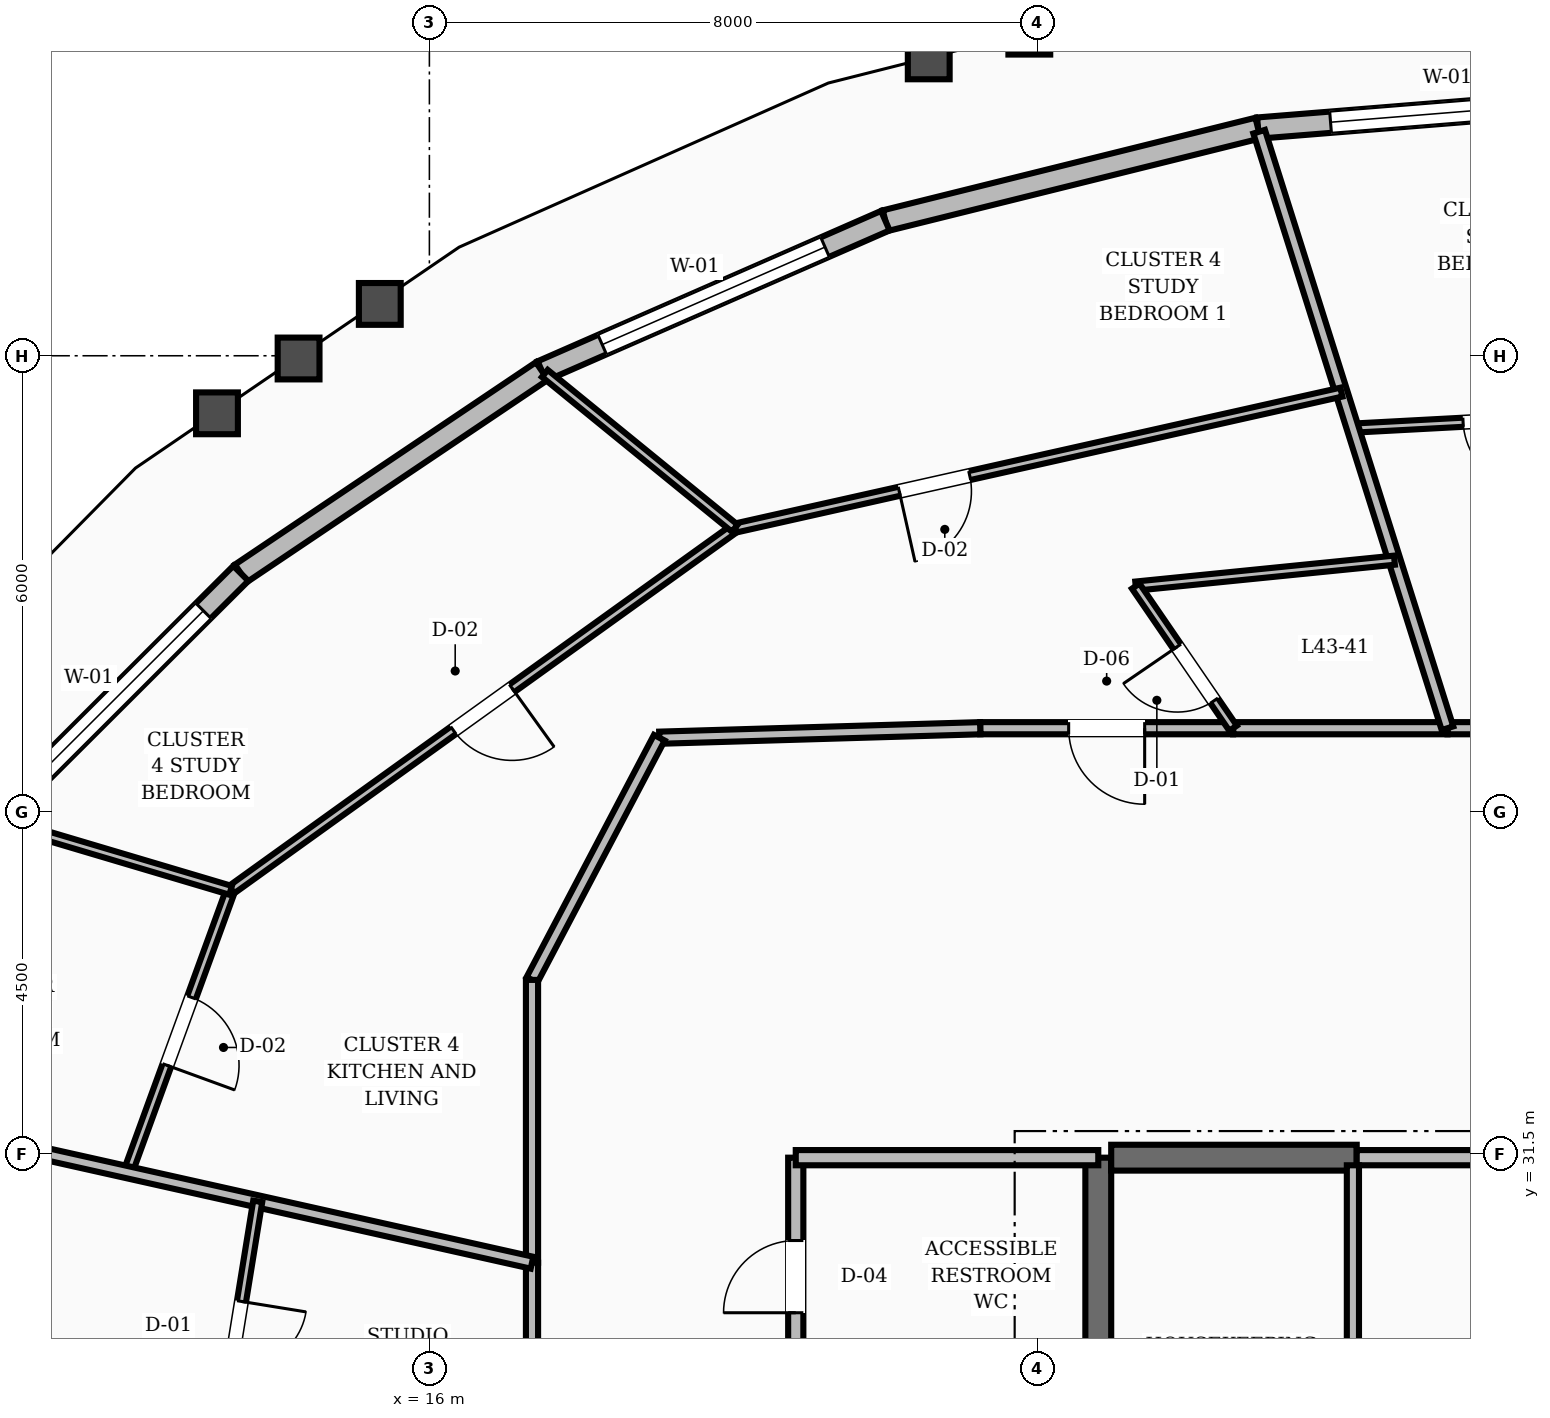
"""IFC4 building model, lengths in metres.
Left out: names, types, materials, properties, quantities, classifications, styles, units other than length and angle.
Written with IfcOpenShell. Run it as: python <this file> out.ifc"""

import sys

from ifc_helpers import new_model, si_unit, direction, frame, frame_2d, origin, place, context, subcontext, project, spatial, rectangle, extrude, element, fill, save


model = new_model("IFC4")
c1 = context("Model", 3, precision=1e-05, world=origin(), true_north=direction((0.0, 1.0)))
c2 = subcontext(c1, "Body", "Model", "MODEL_VIEW")
j1 = project(units=[si_unit("LENGTHUNIT", "METRE"), si_unit("PLANEANGLEUNIT", "RADIAN")], contexts=[c1])
p1 = place(None, origin())
s1 = spatial("IfcSite", under=j1, at=p1, CompositionType="ELEMENT")
p2 = place(p1, origin())
s2 = spatial("IfcBuilding", under=s1, at=p2, CompositionType="ELEMENT")
p3 = place(p2, frame((0.0, 0.0, 167.6)))
s3 = spatial("IfcBuildingStorey", under=s2, at=p3, CompositionType="ELEMENT", Elevation=167.6)
p4 = place(p3, frame((24.8, 25.15, 0.0), z_axis=(0.0, 0.0, 1.0), x_axis=(0.0, 1.0, 0.0)))
e1 = element("IfcWall", 1, at=p4, inside=s3, PredefinedType="SHEAR", context=c2, shape_type="SweptSolid", body=[
    extrude(rectangle(XDim=6.3, YDim=0.34, at=frame_2d((3.15, 0.0))), origin(), (0.0, 0.0, 1.0), 3.6),
])
p5 = place(p3, frame((24.97, 31.45, 0.0), z_axis=(0.0, 0.0, 1.0), x_axis=(1.0, 0.0, 0.0)))
e2 = element("IfcWall", 2, at=p5, inside=s3, PredefinedType="SHEAR", context=c2, shape_type="SweptSolid", body=[
    extrude(rectangle(XDim=3.23, YDim=0.34, at=frame_2d((1.615, 0.0))), origin(), (0.0, 0.0, 1.0), 3.6),
])
p6 = place(p3, frame((32.0, 45.407, 0.0), z_axis=(0.0, 0.0, 1.0), x_axis=(-0.996760870248, -0.080422431831, 0.0)))
e3 = element("IfcWall", 3, at=p6, inside=s3, PredefinedType="STANDARD", context=c2, shape_type="SweptSolid", body=[
    extrude(rectangle(XDim=5.115, YDim=0.28, at=frame_2d((2.558, 0.0))), origin(), (0.0, 0.0, 1.0), 2.82),
])
p7 = place(p6, frame((0.958, 0.0, 0.8)))
e4 = element("IfcOpeningElement", 4, at=p7, cuts=e3, PredefinedType="OPENING", context=c2, shape_type="SweptSolid", body=[
    extrude(rectangle(XDim=3.2, YDim=1.65, at=frame_2d((1.6, 0.825))), frame((0.0, 0.15, 0.0), z_axis=(0.0, -1.0, 0.0), x_axis=(1.0, 0.0, 0.0)), (0.0, 0.0, 1.0), 0.3),
])
p8 = place(p3, frame((26.901, 44.995, 0.0), z_axis=(0.0, 0.0, 1.0), x_axis=(-0.970488320416, -0.241148128617, 0.0)))
e5 = element("IfcWall", 5, at=p8, inside=s3, PredefinedType="STANDARD", context=c2, shape_type="SweptSolid", body=[
    extrude(rectangle(XDim=5.052, YDim=0.28, at=frame_2d((2.526, 0.0))), origin(), (0.0, 0.0, 1.0), 2.82),
])
p9 = place(p3, frame((21.999, 43.777, 0.0), z_axis=(0.0, 0.0, 1.0), x_axis=(-0.916070979736, -0.401016159381, 0.0)))
e6 = element("IfcWall", 6, at=p9, inside=s3, PredefinedType="STANDARD", context=c2, shape_type="SweptSolid", body=[
    extrude(rectangle(XDim=4.933, YDim=0.28, at=frame_2d((2.466, 0.0))), origin(), (0.0, 0.0, 1.0), 2.82),
])
p10 = place(p9, frame((0.866, 0.0, 0.8)))
e7 = element("IfcOpeningElement", 7, at=p10, cuts=e6, PredefinedType="OPENING", context=c2, shape_type="SweptSolid", body=[
    extrude(rectangle(XDim=3.2, YDim=1.65, at=frame_2d((1.6, 0.825))), frame((0.0, 0.15, 0.0), z_axis=(0.0, -1.0, 0.0), x_axis=(1.0, 0.0, 0.0)), (0.0, 0.0, 1.0), 0.3),
])
p11 = place(p3, frame((17.48, 41.799, 0.0), z_axis=(0.0, 0.0, 1.0), x_axis=(-0.829911180813, -0.557895538575, 0.0)))
e8 = element("IfcWall", 8, at=p11, inside=s3, PredefinedType="STANDARD", context=c2, shape_type="SweptSolid", body=[
    extrude(rectangle(XDim=4.772, YDim=0.28, at=frame_2d((2.386, 0.0))), origin(), (0.0, 0.0, 1.0), 2.82),
])
p12 = place(p3, frame((13.52, 39.137, 0.0), z_axis=(0.0, 0.0, 1.0), x_axis=(-0.707797600077, -0.706415286729, 0.0)))
e9 = element("IfcWall", 9, at=p12, inside=s3, PredefinedType="STANDARD", context=c2, shape_type="SweptSolid", body=[
    extrude(rectangle(XDim=4.592, YDim=0.28, at=frame_2d((2.296, 0.0))), origin(), (0.0, 0.0, 1.0), 2.82),
])
p13 = place(p12, frame((0.696, 0.0, 0.8)))
e10 = element("IfcOpeningElement", 10, at=p13, cuts=e9, PredefinedType="OPENING", context=c2, shape_type="SweptSolid", body=[
    extrude(rectangle(XDim=3.2, YDim=1.65, at=frame_2d((1.6, 0.825))), frame((0.0, 0.15, 0.0), z_axis=(0.0, -1.0, 0.0), x_axis=(1.0, 0.0, 0.0)), (0.0, 0.0, 1.0), 0.3),
])
p14 = place(p3, frame((20.82, 28.32, 0.0), z_axis=(0.0, 0.0, 1.0), x_axis=(0.0, 1.0, 0.0)))
e11 = element("IfcWall", 11, at=p14, inside=s3, PredefinedType="SOLIDWALL", context=c2, shape_type="SweptSolid", body=[
    extrude(rectangle(XDim=3.13, YDim=0.2, at=frame_2d((1.565, 0.0))), origin(), (0.0, 0.0, 1.0), 2.8),
])
p15 = place(p14, frame((1.09, 0.0, 0.0)))
e12 = element("IfcOpeningElement", 12, at=p15, cuts=e11, PredefinedType="OPENING", context=c2, shape_type="SweptSolid", body=[
    extrude(rectangle(XDim=0.95, YDim=2.1, at=frame_2d((0.475, 1.05))), frame((0.0, 0.11, 0.0), z_axis=(0.0, -1.0, 0.0), x_axis=(1.0, 0.0, 0.0)), (0.0, 0.0, 1.0), 0.22),
])
p16 = place(p3, frame((20.82, 31.45, 0.0), z_axis=(0.0, 0.0, 1.0), x_axis=(1.0, 0.0, 0.0)))
e13 = element("IfcWall", 13, at=p16, inside=s3, PredefinedType="SOLIDWALL", context=c2, shape_type="SweptSolid", body=[
    extrude(rectangle(XDim=3.98, YDim=0.2, at=frame_2d((1.99, 0.0))), origin(), (0.0, 0.0, 1.0), 2.8),
])
p17 = place(p3, frame((28.2, 31.45, 0.0), z_axis=(0.0, 0.0, 1.0), x_axis=(1.0, 0.0, 0.0)))
e14 = element("IfcWall", 14, at=p17, inside=s3, PredefinedType="SOLIDWALL", context=c2, shape_type="SweptSolid", body=[
    extrude(rectangle(XDim=7.6, YDim=0.2, at=frame_2d((3.8, 0.0))), origin(), (0.0, 0.0, 1.0), 2.8),
])
p18 = place(p3, frame((28.15, 25.25, 0.0), z_axis=(0.0, 0.0, 1.0), x_axis=(0.0, 1.0, 0.0)))
e15 = element("IfcWall", 15, at=p18, inside=s3, PredefinedType="SOLIDWALL", context=c2, shape_type="SweptSolid", body=[
    extrude(rectangle(XDim=6.1, YDim=0.16, at=frame_2d((3.05, 0.0))), origin(), (0.0, 0.0, 1.0), 2.8),
])
p19 = place(p3, frame((32.0, 37.1, 0.0), z_axis=(0.0, 0.0, 1.0), x_axis=(-1.0, 0.0, 0.0)))
e16 = element("IfcWall", 16, at=p19, inside=s3, PredefinedType="SOLIDWALL", context=c2, shape_type="SweptSolid", body=[
    extrude(rectangle(XDim=2.606, YDim=0.16, at=frame_2d((1.303, 0.0))), origin(), (0.0, 0.0, 1.0), 2.8),
])
p20 = place(p3, frame((29.394, 37.1, 0.0), z_axis=(0.0, 0.0, 1.0), x_axis=(-1.0, 0.0, 0.0)))
e17 = element("IfcWall", 17, at=p20, inside=s3, PredefinedType="SOLIDWALL", context=c2, shape_type="SweptSolid", body=[
    extrude(rectangle(XDim=2.821, YDim=0.16, at=frame_2d((1.41, 0.0))), origin(), (0.0, 0.0, 1.0), 2.8),
])
p21 = place(p3, frame((26.574, 37.1, 0.0), z_axis=(0.0, 0.0, 1.0), x_axis=(-1.0, 0.0, 0.0)))
e18 = element("IfcWall", 18, at=p21, inside=s3, PredefinedType="SOLIDWALL", context=c2, shape_type="SweptSolid", body=[
    extrude(rectangle(XDim=3.327, YDim=0.16, at=frame_2d((1.664, 0.0))), origin(), (0.0, 0.0, 1.0), 2.8),
])
p22 = place(p21, frame((1.164, 0.0, 0.0)))
e19 = element("IfcOpeningElement", 19, at=p22, cuts=e18, PredefinedType="OPENING", context=c2, shape_type="SweptSolid", body=[
    extrude(rectangle(XDim=1.0, YDim=2.1, at=frame_2d((0.5, 1.05))), frame((0.0, 0.09, 0.0), z_axis=(0.0, -1.0, 0.0), x_axis=(1.0, 0.0, 0.0)), (0.0, 0.0, 1.0), 0.18),
])
p23 = place(p3, frame((23.247, 37.1, 0.0), z_axis=(0.0, 0.0, 1.0), x_axis=(-0.999561990195, -0.029594387265, 0.0)))
e20 = element("IfcWall", 20, at=p23, inside=s3, PredefinedType="SOLIDWALL", context=c2, shape_type="SweptSolid", body=[
    extrude(rectangle(XDim=4.224, YDim=0.16, at=frame_2d((2.112, 0.0))), origin(), (0.0, 0.0, 1.0), 2.8),
])
p24 = place(p3, frame((19.025, 36.975, 0.0), z_axis=(0.0, 0.0, 1.0), x_axis=(-0.46527115782, -0.885168204185, 0.0)))
e21 = element("IfcWall", 21, at=p24, inside=s3, PredefinedType="SOLIDWALL", context=c2, shape_type="SweptSolid", body=[
    extrude(rectangle(XDim=3.6, YDim=0.16, at=frame_2d((1.8, 0.0))), origin(), (0.0, 0.0, 1.0), 2.8),
])
p25 = place(p3, frame((17.35, 33.789, 0.0), z_axis=(0.0, 0.0, 1.0), x_axis=(0.0, -1.0, 0.0)))
e22 = element("IfcWall", 22, at=p25, inside=s3, PredefinedType="SOLIDWALL", context=c2, shape_type="SweptSolid", body=[
    extrude(rectangle(XDim=3.721, YDim=0.16, at=frame_2d((1.86, 0.0))), origin(), (0.0, 0.0, 1.0), 2.8),
])
p26 = place(p3, frame((17.35, 30.068, 0.0), z_axis=(0.0, 0.0, 1.0), x_axis=(0.0, -1.0, 0.0)))
e23 = element("IfcWall", 23, at=p26, inside=s3, PredefinedType="SOLIDWALL", context=c2, shape_type="SweptSolid", body=[
    extrude(rectangle(XDim=3.154, YDim=0.16, at=frame_2d((1.577, 0.0))), origin(), (0.0, 0.0, 1.0), 2.8),
])
p27 = place(p3, frame((32.0, 41.253, 0.0), z_axis=(0.0, 0.0, 1.0), x_axis=(-0.998575909079, -0.053349356192, 0.0)))
e24 = element("IfcWall", 24, at=p27, inside=s3, PredefinedType="PARTITIONING", context=c2, shape_type="SweptSolid", body=[
    extrude(rectangle(XDim=3.858, YDim=0.12, at=frame_2d((1.929, 0.0))), origin(), (0.0, 0.0, 1.0), 2.8),
])
p28 = place(p27, frame((1.454, 0.0, 0.0)))
e25 = element("IfcOpeningElement", 25, at=p28, cuts=e24, PredefinedType="OPENING", context=c2, shape_type="SweptSolid", body=[
    extrude(rectangle(XDim=0.95, YDim=2.1, at=frame_2d((0.475, 1.05))), frame((0.0, 0.07, 0.0), z_axis=(0.0, -1.0, 0.0), x_axis=(1.0, 0.0, 0.0)), (0.0, 0.0, 1.0), 0.14),
])
p29 = place(p3, frame((29.394, 37.1, 0.0), z_axis=(0.0, 0.0, 1.0), x_axis=(-0.301084514056, 0.953597459831, 0.0)))
e26 = element("IfcWall", 26, at=p29, inside=s3, PredefinedType="SOLIDWALL", context=c2, shape_type="SweptSolid", body=[
    extrude(rectangle(XDim=8.229, YDim=0.16, at=frame_2d((4.115, 0.0))), origin(), (0.0, 0.0, 1.0), 2.8),
])
p30 = place(p3, frame((28.696, 39.311, 0.0), z_axis=(0.0, 0.0, 1.0), x_axis=(-0.995009592211, -0.099779313529, 0.0)))
e27 = element("IfcWall", 27, at=p30, inside=s3, PredefinedType="PARTITIONING", context=c2, shape_type="SweptSolid", body=[
    extrude(rectangle(XDim=3.421, YDim=0.12, at=frame_2d((1.71, 0.0))), origin(), (0.0, 0.0, 1.0), 2.8),
])
p31 = place(p3, frame((26.574, 37.1, 0.0), z_axis=(0.0, 0.0, 1.0), x_axis=(-0.565270811555, 0.824905394335, 0.0)))
e28 = element("IfcWall", 28, at=p31, inside=s3, PredefinedType="PARTITIONING", context=c2, shape_type="SweptSolid", body=[
    extrude(rectangle(XDim=2.266, YDim=0.12, at=frame_2d((1.133, 0.0))), origin(), (0.0, 0.0, 1.0), 2.8),
])
p32 = place(p31, frame((0.44, 0.0, 0.0)))
e29 = element("IfcOpeningElement", 29, at=p32, cuts=e28, PredefinedType="OPENING", context=c2, shape_type="SweptSolid", body=[
    extrude(rectangle(XDim=0.86, YDim=2.1, at=frame_2d((0.43, 1.05))), frame((0.0, 0.07, 0.0), z_axis=(0.0, -1.0, 0.0), x_axis=(1.0, 0.0, 0.0)), (0.0, 0.0, 1.0), 0.14),
])
p33 = place(p3, frame((27.998, 41.521, 0.0), z_axis=(0.0, 0.0, 1.0), x_axis=(-0.975756725435, -0.218857973964, 0.0)))
e30 = element("IfcWall", 30, at=p33, inside=s3, PredefinedType="PARTITIONING", context=c2, shape_type="SweptSolid", body=[
    extrude(rectangle(XDim=8.179, YDim=0.12, at=frame_2d((4.089, 0.0))), origin(), (0.0, 0.0, 1.0), 2.8),
])
p34 = place(p33, frame((5.011, 0.0, 0.0)))
e31 = element("IfcOpeningElement", 31, at=p34, cuts=e30, PredefinedType="OPENING", context=c2, shape_type="SweptSolid", body=[
    extrude(rectangle(XDim=0.95, YDim=2.1, at=frame_2d((0.475, 1.05))), frame((0.0, 0.07, 0.0), z_axis=(0.0, -1.0, 0.0), x_axis=(1.0, 0.0, 0.0)), (0.0, 0.0, 1.0), 0.14),
])
p35 = place(p3, frame((20.018, 39.731, 0.0), z_axis=(0.0, 0.0, 1.0), x_axis=(-0.812175175791, -0.583413647277, 0.0)))
e32 = element("IfcWall", 32, at=p35, inside=s3, PredefinedType="PARTITIONING", context=c2, shape_type="SweptSolid", body=[
    extrude(rectangle(XDim=8.167, YDim=0.12, at=frame_2d((4.083, 0.0))), origin(), (0.0, 0.0, 1.0), 2.8),
])
p36 = place(p35, frame((3.608, 0.0, 0.0)))
e33 = element("IfcOpeningElement", 33, at=p36, cuts=e32, PredefinedType="OPENING", context=c2, shape_type="SweptSolid", body=[
    extrude(rectangle(XDim=0.95, YDim=2.1, at=frame_2d((0.475, 1.05))), frame((0.0, 0.07, 0.0), z_axis=(0.0, -1.0, 0.0), x_axis=(1.0, 0.0, 0.0)), (0.0, 0.0, 1.0), 0.14),
])
p37 = place(p3, frame((20.018, 39.731, 0.0), z_axis=(0.0, 0.0, 1.0), x_axis=(-0.775258339424, 0.631644288467, 0.0)))
e34 = element("IfcWall", 34, at=p37, inside=s3, PredefinedType="PARTITIONING", context=c2, shape_type="SweptSolid", body=[
    extrude(rectangle(XDim=3.223, YDim=0.12, at=frame_2d((1.612, 0.0))), origin(), (0.0, 0.0, 1.0), 2.8),
])
p38 = place(p3, frame((13.385, 34.967, 0.0), z_axis=(0.0, 0.0, 1.0), x_axis=(-0.34255715009, -0.939496992503, 0.0)))
e35 = element("IfcWall", 35, at=p38, inside=s3, PredefinedType="PARTITIONING", context=c2, shape_type="SweptSolid", body=[
    extrude(rectangle(XDim=3.948, YDim=0.12, at=frame_2d((1.974, 0.0))), origin(), (0.0, 0.0, 1.0), 2.8),
])
p39 = place(p38, frame((1.499, 0.0, 0.0)))
e36 = element("IfcOpeningElement", 36, at=p39, cuts=e35, PredefinedType="OPENING", context=c2, shape_type="SweptSolid", body=[
    extrude(rectangle(XDim=0.95, YDim=2.1, at=frame_2d((0.475, 1.05))), frame((0.0, 0.07, 0.0), z_axis=(0.0, -1.0, 0.0), x_axis=(1.0, 0.0, 0.0)), (0.0, 0.0, 1.0), 0.14),
])
p40 = place(p3, frame((13.385, 34.967, 0.0), z_axis=(0.0, 0.0, 1.0), x_axis=(-0.958568452923, 0.284862284378, 0.0)))
e37 = element("IfcWall", 37, at=p40, inside=s3, PredefinedType="PARTITIONING", context=c2, shape_type="SweptSolid", body=[
    extrude(rectangle(XDim=3.2, YDim=0.12, at=frame_2d((1.6, 0.0))), origin(), (0.0, 0.0, 1.0), 2.8),
])
p41 = place(p3, frame((17.35, 30.068, 0.0), z_axis=(0.0, 0.0, 1.0), x_axis=(-0.975886456244, 0.218278777072, 0.0)))
e38 = element("IfcWall", 38, at=p41, inside=s3, PredefinedType="SOLIDWALL", context=c2, shape_type="SweptSolid", body=[
    extrude(rectangle(XDim=9.68, YDim=0.16, at=frame_2d((4.84, 0.0))), origin(), (0.0, 0.0, 1.0), 2.8),
])
p42 = place(p3, frame((13.742, 30.875, 0.0), z_axis=(0.0, 0.0, 1.0), x_axis=(-0.160244329289, -0.987077380417, 0.0)))
e39 = element("IfcWall", 39, at=p42, inside=s3, PredefinedType="PARTITIONING", context=c2, shape_type="SweptSolid", body=[
    extrude(rectangle(XDim=3.527, YDim=0.12, at=frame_2d((1.764, 0.0))), origin(), (0.0, 0.0, 1.0), 2.8),
])
p43 = place(p42, frame((1.333, 0.0, 0.0)))
e40 = element("IfcOpeningElement", 40, at=p43, cuts=e39, PredefinedType="OPENING", context=c2, shape_type="SweptSolid", body=[
    extrude(rectangle(XDim=0.86, YDim=2.1, at=frame_2d((0.43, 1.05))), frame((0.0, 0.07, 0.0), z_axis=(0.0, -1.0, 0.0), x_axis=(1.0, 0.0, 0.0)), (0.0, 0.0, 1.0), 0.14),
])
p44 = place(p7, origin())
e41 = element("IfcWindow", 41, at=p44, inside=s3, PartitioningType="SINGLE_PANEL", PredefinedType="WINDOW", context=c2, shape_type="SweptSolid", body=[
    extrude(rectangle(XDim=3.2, YDim=1.65, at=frame_2d((1.6, 0.825))), frame((0.0, 0.03, 0.0), z_axis=(0.0, -1.0, 0.0), x_axis=(1.0, 0.0, 0.0)), (0.0, 0.0, 1.0), 0.06),
])
fill(e4, e41)
p45 = place(p10, origin())
e42 = element("IfcWindow", 42, at=p45, inside=s3, PartitioningType="SINGLE_PANEL", PredefinedType="WINDOW", context=c2, shape_type="SweptSolid", body=[
    extrude(rectangle(XDim=3.2, YDim=1.65, at=frame_2d((1.6, 0.825))), frame((0.0, 0.03, 0.0), z_axis=(0.0, -1.0, 0.0), x_axis=(1.0, 0.0, 0.0)), (0.0, 0.0, 1.0), 0.06),
])
fill(e7, e42)
p46 = place(p13, origin())
e43 = element("IfcWindow", 43, at=p46, inside=s3, PartitioningType="SINGLE_PANEL", PredefinedType="WINDOW", context=c2, shape_type="SweptSolid", body=[
    extrude(rectangle(XDim=3.2, YDim=1.65, at=frame_2d((1.6, 0.825))), frame((0.0, 0.03, 0.0), z_axis=(0.0, -1.0, 0.0), x_axis=(1.0, 0.0, 0.0)), (0.0, 0.0, 1.0), 0.06),
])
fill(e10, e43)
p47 = place(p15, origin())
e44 = element("IfcDoor", 44, at=p47, inside=s3, OperationType="SINGLE_SWING_LEFT", PredefinedType="DOOR", context=c2, shape_type="SweptSolid", body=[
    extrude(rectangle(XDim=0.95, YDim=2.1, at=frame_2d((0.475, 1.05))), frame((0.0, 0.025, 0.0), z_axis=(0.0, -1.0, 0.0), x_axis=(1.0, 0.0, 0.0)), (0.0, 0.0, 1.0), 0.05),
])
fill(e12, e44)
p48 = place(p28, origin())
e45 = element("IfcDoor", 45, at=p48, inside=s3, OperationType="SINGLE_SWING_LEFT", PredefinedType="DOOR", context=c2, shape_type="SweptSolid", body=[
    extrude(rectangle(XDim=0.95, YDim=2.1, at=frame_2d((0.475, 1.05))), frame((0.0, 0.025, 0.0), z_axis=(0.0, -1.0, 0.0), x_axis=(1.0, 0.0, 0.0)), (0.0, 0.0, 1.0), 0.05),
])
fill(e25, e45)
p49 = place(p32, origin())
e46 = element("IfcDoor", 46, at=p49, inside=s3, OperationType="SINGLE_SWING_RIGHT", PredefinedType="DOOR", context=c2, shape_type="SweptSolid", body=[
    extrude(rectangle(XDim=0.86, YDim=2.1, at=frame_2d((0.43, 1.05))), frame((0.0, 0.025, 0.0), z_axis=(0.0, -1.0, 0.0), x_axis=(1.0, 0.0, 0.0)), (0.0, 0.0, 1.0), 0.05),
])
fill(e29, e46)
p50 = place(p22, origin())
e47 = element("IfcDoor", 47, at=p50, inside=s3, OperationType="SINGLE_SWING_LEFT", PredefinedType="DOOR", context=c2, shape_type="SweptSolid", body=[
    extrude(rectangle(XDim=1.0, YDim=2.1, at=frame_2d((0.5, 1.05))), frame((0.0, 0.025, 0.0), z_axis=(0.0, -1.0, 0.0), x_axis=(1.0, 0.0, 0.0)), (0.0, 0.0, 1.0), 0.05),
])
fill(e19, e47)
p51 = place(p34, origin())
e48 = element("IfcDoor", 48, at=p51, inside=s3, OperationType="SINGLE_SWING_RIGHT", PredefinedType="DOOR", context=c2, shape_type="SweptSolid", body=[
    extrude(rectangle(XDim=0.95, YDim=2.1, at=frame_2d((0.475, 1.05))), frame((0.0, 0.025, 0.0), z_axis=(0.0, -1.0, 0.0), x_axis=(1.0, 0.0, 0.0)), (0.0, 0.0, 1.0), 0.05),
])
fill(e31, e48)
p52 = place(p36, origin())
e49 = element("IfcDoor", 49, at=p52, inside=s3, OperationType="SINGLE_SWING_LEFT", PredefinedType="DOOR", context=c2, shape_type="SweptSolid", body=[
    extrude(rectangle(XDim=0.95, YDim=2.1, at=frame_2d((0.475, 1.05))), frame((0.0, 0.025, 0.0), z_axis=(0.0, -1.0, 0.0), x_axis=(1.0, 0.0, 0.0)), (0.0, 0.0, 1.0), 0.05),
])
fill(e33, e49)
p53 = place(p39, origin())
e50 = element("IfcDoor", 50, at=p53, inside=s3, OperationType="SINGLE_SWING_RIGHT", PredefinedType="DOOR", context=c2, shape_type="SweptSolid", body=[
    extrude(rectangle(XDim=0.95, YDim=2.1, at=frame_2d((0.475, 1.05))), frame((0.0, 0.025, 0.0), z_axis=(0.0, -1.0, 0.0), x_axis=(1.0, 0.0, 0.0)), (0.0, 0.0, 1.0), 0.05),
])
fill(e36, e50)
p54 = place(p43, origin())
e51 = element("IfcDoor", 51, at=p54, inside=s3, OperationType="SINGLE_SWING_LEFT", PredefinedType="DOOR", context=c2, shape_type="SweptSolid", body=[
    extrude(rectangle(XDim=0.86, YDim=2.1, at=frame_2d((0.43, 1.05))), frame((0.0, 0.025, 0.0), z_axis=(0.0, -1.0, 0.0), x_axis=(1.0, 0.0, 0.0)), (0.0, 0.0, 1.0), 0.05),
])
fill(e40, e51)
save(model, sys.argv[1])
